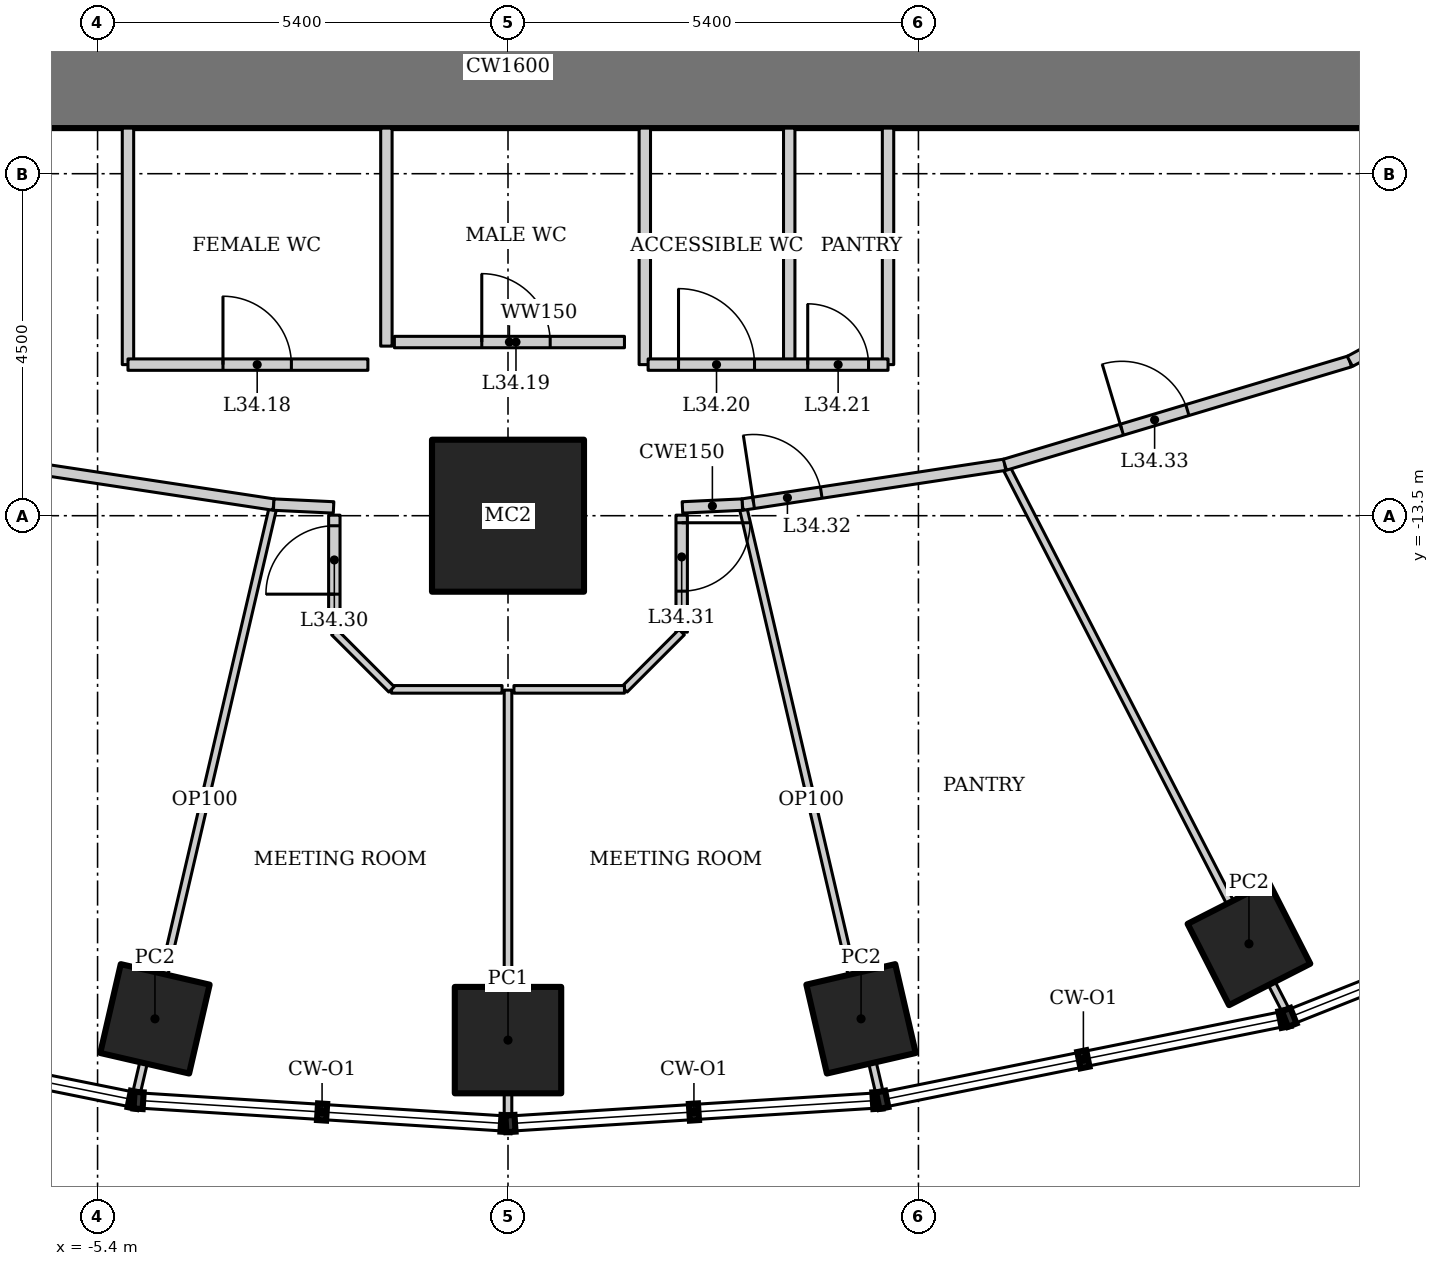
"""IFC4 building model, lengths in metres.
Left out: names, types, materials, properties, quantities, classifications, styles, units other than length and angle.
Written with IfcOpenShell. Run it as: python <this file> out.ifc"""

import sys

from ifc_helpers import new_model, si_unit, direction, frame, frame_2d, origin, origin_2d, place, context, subcontext, project, spatial, rectangle, hollow_rectangle, extrude, element, fill, save


model = new_model("IFC4")
c1 = context("Model", 3, precision=1e-05, world=origin(), true_north=direction((0.0, 1.0)))
c2 = subcontext(c1, "Body", "Model", "MODEL_VIEW")
j1 = project(units=[si_unit("LENGTHUNIT", "METRE"), si_unit("PLANEANGLEUNIT", "RADIAN")], contexts=[c1])
p1 = place(None, origin())
s1 = spatial("IfcSite", under=j1, at=p1, CompositionType="ELEMENT")
p2 = place(p1, origin())
s2 = spatial("IfcBuilding", under=s1, at=p2, CompositionType="ELEMENT")
p3 = place(p2, frame((0.0, 0.0, 146.8)))
s3 = spatial("IfcBuildingStorey", under=s2, at=p3, CompositionType="ELEMENT", Elevation=146.8)
p4 = place(p3, frame((0.0, -13.5, 0.0), z_axis=(0.0, 0.0, 1.0), x_axis=(1.0, 0.0, 0.0)))
e1 = element("IfcColumn", 1, at=p4, inside=s3, PredefinedType="COLUMN", context=c2, shape_type="SweptSolid", body=[
    extrude(hollow_rectangle(XDim=2.0, YDim=2.0, WallThickness=0.17, at=origin_2d()), origin(), (0.0, 0.0, 1.0), 4.2),
])
p5 = place(p3, frame((-4.645, -20.12, 0.0), z_axis=(0.0, 0.0, 1.0), x_axis=(0.224951054344, 0.974370064785, 0.0)))
e2 = element("IfcColumn", 2, at=p5, inside=s3, PredefinedType="COLUMN", context=c2, shape_type="SweptSolid", body=[
    extrude(hollow_rectangle(XDim=1.2, YDim=1.2, WallThickness=0.1, at=origin_2d()), origin(), (0.0, 0.0, 1.0), 4.2),
])
p6 = place(p3, frame((0.0, -20.4, 0.0), z_axis=(0.0, 0.0, 1.0), x_axis=(1.0, 0.0, 0.0)))
e3 = element("IfcColumn", 3, at=p6, inside=s3, PredefinedType="COLUMN", context=c2, shape_type="SweptSolid", body=[
    extrude(hollow_rectangle(XDim=1.4, YDim=1.4, WallThickness=0.1, at=origin_2d()), origin(), (0.0, 0.0, 1.0), 4.2),
])
for number, where, z_axis, x_axis in (
    (4, (4.645, -20.12, 0.0), (0.0, 0.0, 1.0), (0.974, 0.225, 0.0)),
    (5, (9.749, -19.133, 0.0), (0.0, 0.0, 1.0), (0.891, 0.454, 0.0)),
):
    element("IfcColumn", number, at=place(p3, frame(where, z_axis=z_axis, x_axis=x_axis)), inside=s3, PredefinedType="COLUMN", context=c2, shape_type="SweptSolid", body=[
        extrude(hollow_rectangle(XDim=1.2, YDim=1.2, WallThickness=0.1, at=origin_2d()), origin(), (0.0, 0.0, 1.0), 4.2),
    ])
p7 = place(p3, frame((-12.2, -7.6, 0.0), z_axis=(0.0, 0.0, 1.0), x_axis=(1.0, 0.0, 0.0)))
e6 = element("IfcWall", 6, at=p7, inside=s3, PredefinedType="SHEAR", context=c2, shape_type="SweptSolid", body=[
    extrude(rectangle(XDim=24.4, YDim=1.6, at=frame_2d((12.2, 0.0))), origin(), (0.0, 0.0, 1.0), 4.2),
])
for number, where, z_axis, x_axis in (
    (7, (-4.897, -21.135, 0.0), (0.0, 0.0, 1.0), (0.227, 0.974, 0.0)),
    (8, (4.897, -21.135, 0.0), (0.0, 0.0, 1.0), (-0.227, 0.974, 0.0)),
):
    element("IfcWall", number, at=place(p3, frame(where, z_axis=z_axis, x_axis=x_axis)), inside=s3, PredefinedType="PARTITIONING", context=c2, shape_type="SweptSolid", body=[
        extrude(rectangle(XDim=7.99, YDim=0.1, at=frame_2d((3.995, 0.0))), origin(), (0.0, 0.0, 1.0), 3.293),
    ])
p8 = place(p3, frame((10.253, -20.052, 0.0), z_axis=(0.0, 0.0, 1.0), x_axis=(-0.457535449567, 0.889191381194, 0.0)))
e9 = element("IfcWall", 9, at=p8, inside=s3, PredefinedType="PARTITIONING", context=c2, shape_type="SweptSolid", body=[
    extrude(rectangle(XDim=8.123, YDim=0.1, at=frame_2d((4.061, 0.0))), origin(), (0.0, 0.0, 1.0), 3.349),
])
p9 = place(p3, frame((-6.537, -12.829, 0.0), z_axis=(0.0, 0.0, 1.0), x_axis=(0.988668719464, -0.150113833987, 0.0)))
e10 = element("IfcWall", 10, at=p9, inside=s3, PredefinedType="PARTITIONING", context=c2, shape_type="SweptSolid", body=[
    extrude(rectangle(XDim=3.493, YDim=0.15, at=frame_2d((1.747, 0.0))), origin(), (0.0, 0.0, 1.0), 4.05),
])
p10 = place(p3, frame((3.083, -13.354, 0.0), z_axis=(0.0, 0.0, 1.0), x_axis=(0.988668719464, 0.150113833987, 0.0)))
e11 = element("IfcWall", 11, at=p10, inside=s3, PredefinedType="PARTITIONING", context=c2, shape_type="SweptSolid", body=[
    extrude(rectangle(XDim=3.493, YDim=0.15, at=frame_2d((1.747, 0.0))), origin(), (0.0, 0.0, 1.0), 4.05),
])
p11 = place(p10, frame((0.15, 0.0, 0.0)))
e12 = element("IfcOpeningElement", 12, at=p11, cuts=e11, PredefinedType="OPENING", context=c2, shape_type="SweptSolid", body=[
    extrude(rectangle(XDim=0.9, YDim=2.1, at=frame_2d((0.45, 1.05))), frame((0.0, 0.085, 0.0), z_axis=(0.0, -1.0, 0.0), x_axis=(1.0, 0.0, 0.0)), (0.0, 0.0, 1.0), 0.17),
])
p12 = place(p3, frame((6.537, -12.829, 0.0), z_axis=(0.0, 0.0, 1.0), x_axis=(0.957933992798, 0.286988615527, 0.0)))
e13 = element("IfcWall", 13, at=p12, inside=s3, PredefinedType="PARTITIONING", context=c2, shape_type="SweptSolid", body=[
    extrude(rectangle(XDim=4.738, YDim=0.15, at=frame_2d((2.369, 0.0))), origin(), (0.0, 0.0, 1.0), 4.05),
])
p13 = place(p12, frame((1.607, 0.0, 0.0)))
e14 = element("IfcOpeningElement", 14, at=p13, cuts=e13, PredefinedType="OPENING", context=c2, shape_type="SweptSolid", body=[
    extrude(rectangle(XDim=0.9, YDim=2.1, at=frame_2d((0.45, 1.05))), frame((0.0, 0.085, 0.0), z_axis=(0.0, -1.0, 0.0), x_axis=(1.0, 0.0, 0.0)), (0.0, 0.0, 1.0), 0.17),
])
p14 = place(p3, frame((11.076, -11.469, 0.0), z_axis=(0.0, 0.0, 1.0), x_axis=(0.879436285334, 0.476016617397, 0.0)))
e15 = element("IfcWall", 15, at=p14, inside=s3, PredefinedType="PARTITIONING", context=c2, shape_type="SweptSolid", body=[
    extrude(rectangle(XDim=5.253, YDim=0.15, at=frame_2d((2.626, 0.0))), origin(), (0.0, 0.0, 1.0), 4.05),
])
for number, where, z_axis, x_axis in (
    (16, (-5.0, -8.4, 0.0), (0.0, 0.0, 1.0), (0.0, -1.0, 0.0)),
    (17, (5.0, -8.4, 0.0), (0.0, 0.0, 1.0), (0.0, -1.0, 0.0)),
    (18, (1.8, -8.4, 0.0), (0.0, 0.0, 1.0), (0.0, -1.0, 0.0)),
    (19, (3.7, -8.4, 0.0), (0.0, 0.0, 1.0), (0.0, -1.0, 0.0)),
):
    element("IfcWall", number, at=place(p3, frame(where, z_axis=z_axis, x_axis=x_axis)), inside=s3, PredefinedType="SOLIDWALL", context=c2, shape_type="SweptSolid", body=[
        extrude(rectangle(XDim=3.112, YDim=0.15, at=frame_2d((1.556, 0.0))), origin(), (0.0, 0.0, 1.0), 4.05),
    ])
p15 = place(p3, frame((0.0, -21.445, 0.0), z_axis=(0.0, 0.0, 1.0), x_axis=(0.0, 1.0, 0.0)))
e20 = element("IfcWall", 20, at=p15, inside=s3, PredefinedType="PARTITIONING", context=c2, shape_type="SweptSolid", body=[
    extrude(rectangle(XDim=5.65, YDim=0.1, at=frame_2d((2.825, 0.0))), origin(), (0.0, 0.0, 1.0), 3.646),
])
for number, where, z_axis, x_axis in (
    (21, (-3.083, -13.354, 0.0), (0.0, 0.0, 1.0), (0.999, -0.047, 0.0)),
    (22, (2.295, -13.391, 0.0), (0.0, 0.0, 1.0), (0.999, 0.047, 0.0)),
):
    element("IfcWall", number, at=place(p3, frame(where, z_axis=z_axis, x_axis=x_axis)), inside=s3, PredefinedType="PARTITIONING", context=c2, shape_type="SweptSolid", body=[
        extrude(rectangle(XDim=0.789, YDim=0.15, at=frame_2d((0.395, 0.0))), origin(), (0.0, 0.0, 1.0), 4.05),
    ])
p16 = place(p3, frame((-5.0, -11.512, 0.0), z_axis=(0.0, 0.0, 1.0), x_axis=(1.0, 0.0, 0.0)))
e23 = element("IfcWall", 23, at=p16, inside=s3, PredefinedType="SOLIDWALL", context=c2, shape_type="SweptSolid", body=[
    extrude(rectangle(XDim=3.156, YDim=0.15, at=frame_2d((1.578, 0.0))), origin(), (0.0, 0.0, 1.0), 4.05),
])
p17 = place(p16, frame((1.25, 0.0, 0.0)))
e24 = element("IfcOpeningElement", 24, at=p17, cuts=e23, PredefinedType="OPENING", context=c2, shape_type="SweptSolid", body=[
    extrude(rectangle(XDim=0.9, YDim=2.1, at=frame_2d((0.45, 1.05))), frame((0.0, 0.085, 0.0), z_axis=(0.0, -1.0, 0.0), x_axis=(1.0, 0.0, 0.0)), (0.0, 0.0, 1.0), 0.17),
])
p18 = place(p3, frame((1.844, -11.512, 0.0), z_axis=(0.0, 0.0, 1.0), x_axis=(1.0, 0.0, 0.0)))
e25 = element("IfcWall", 25, at=p18, inside=s3, PredefinedType="SOLIDWALL", context=c2, shape_type="SweptSolid", body=[
    extrude(rectangle(XDim=3.156, YDim=0.15, at=frame_2d((1.578, 0.0))), origin(), (0.0, 0.0, 1.0), 4.05),
])
p19 = place(p18, frame((0.4, 0.0, 0.0)))
e26 = element("IfcOpeningElement", 26, at=p19, cuts=e25, PredefinedType="OPENING", context=c2, shape_type="SweptSolid", body=[
    extrude(rectangle(XDim=1.0, YDim=2.1, at=frame_2d((0.5, 1.05))), frame((0.0, 0.085, 0.0), z_axis=(0.0, -1.0, 0.0), x_axis=(1.0, 0.0, 0.0)), (0.0, 0.0, 1.0), 0.17),
])
p20 = place(p18, frame((2.1, 0.0, 0.0)))
e27 = element("IfcOpeningElement", 27, at=p20, cuts=e25, PredefinedType="OPENING", context=c2, shape_type="SweptSolid", body=[
    extrude(rectangle(XDim=0.8, YDim=2.1, at=frame_2d((0.4, 1.05))), frame((0.0, 0.085, 0.0), z_axis=(0.0, -1.0, 0.0), x_axis=(1.0, 0.0, 0.0)), (0.0, 0.0, 1.0), 0.17),
])
p21 = place(p3, frame((-1.6, -8.4, 0.0), z_axis=(0.0, 0.0, 1.0), x_axis=(0.0, -1.0, 0.0)))
e28 = element("IfcWall", 28, at=p21, inside=s3, PredefinedType="SOLIDWALL", context=c2, shape_type="SweptSolid", body=[
    extrude(rectangle(XDim=2.869, YDim=0.15, at=frame_2d((1.434, 0.0))), origin(), (0.0, 0.0, 1.0), 4.05),
])
p22 = place(p3, frame((-1.495, -11.215, 0.0), z_axis=(0.0, 0.0, 1.0), x_axis=(1.0, 0.0, 0.0)))
e29 = element("IfcWall", 29, at=p22, inside=s3, PredefinedType="SOLIDWALL", context=c2, shape_type="SweptSolid", body=[
    extrude(rectangle(XDim=3.027, YDim=0.15, at=frame_2d((1.514, 0.0))), origin(), (0.0, 0.0, 1.0), 4.05),
])
p23 = place(p22, frame((1.15, 0.0, 0.0)))
e30 = element("IfcOpeningElement", 30, at=p23, cuts=e29, PredefinedType="OPENING", context=c2, shape_type="SweptSolid", body=[
    extrude(rectangle(XDim=0.9, YDim=2.1, at=frame_2d((0.45, 1.05))), frame((0.0, 0.085, 0.0), z_axis=(0.0, -1.0, 0.0), x_axis=(1.0, 0.0, 0.0)), (0.0, 0.0, 1.0), 0.17),
])
p24 = place(p3, frame((-2.285, -15.032, 0.0), z_axis=(0.0, 0.0, 1.0), x_axis=(0.0, 1.0, 0.0)))
e31 = element("IfcWall", 31, at=p24, inside=s3, PredefinedType="PARTITIONING", context=c2, shape_type="SweptSolid", body=[
    extrude(rectangle(XDim=1.54, YDim=0.15, at=frame_2d((0.77, 0.0))), origin(), (0.0, 0.0, 1.0), 4.05),
])
p25 = place(p24, frame((0.5, 0.0, 0.0)))
e32 = element("IfcOpeningElement", 32, at=p25, cuts=e31, PredefinedType="OPENING", context=c2, shape_type="SweptSolid", body=[
    extrude(rectangle(XDim=0.9, YDim=2.1, at=frame_2d((0.45, 1.05))), frame((0.0, 0.085, 0.0), z_axis=(0.0, -1.0, 0.0), x_axis=(1.0, 0.0, 0.0)), (0.0, 0.0, 1.0), 0.17),
])
p26 = place(p3, frame((-0.078, -15.785, 0.0), z_axis=(0.0, 0.0, 1.0), x_axis=(-1.0, 0.0, 0.0)))
e33 = element("IfcWall", 33, at=p26, inside=s3, PredefinedType="PARTITIONING", context=c2, shape_type="SweptSolid", body=[
    extrude(rectangle(XDim=1.454, YDim=0.1, at=frame_2d((0.727, 0.0))), origin(), (0.0, 0.0, 1.0), 4.05),
])
p27 = place(p3, frame((-1.532, -15.785, 0.0), z_axis=(0.0, 0.0, 1.0), x_axis=(-0.707106781187, 0.707106781187, 0.0)))
e34 = element("IfcWall", 34, at=p27, inside=s3, PredefinedType="PARTITIONING", context=c2, shape_type="SweptSolid", body=[
    extrude(rectangle(XDim=1.064, YDim=0.1, at=frame_2d((0.532, 0.0))), origin(), (0.0, 0.0, 1.0), 4.05),
])
p28 = place(p3, frame((2.285, -13.493, 0.0), z_axis=(0.0, 0.0, 1.0), x_axis=(0.0, -1.0, 0.0)))
e35 = element("IfcWall", 35, at=p28, inside=s3, PredefinedType="PARTITIONING", context=c2, shape_type="SweptSolid", body=[
    extrude(rectangle(XDim=1.54, YDim=0.15, at=frame_2d((0.77, 0.0))), origin(), (0.0, 0.0, 1.0), 4.05),
])
p29 = place(p28, frame((0.1, 0.0, 0.0)))
e36 = element("IfcOpeningElement", 36, at=p29, cuts=e35, PredefinedType="OPENING", context=c2, shape_type="SweptSolid", body=[
    extrude(rectangle(XDim=0.9, YDim=2.1, at=frame_2d((0.45, 1.05))), frame((0.0, 0.085, 0.0), z_axis=(0.0, -1.0, 0.0), x_axis=(1.0, 0.0, 0.0)), (0.0, 0.0, 1.0), 0.17),
])
p30 = place(p3, frame((2.285, -15.032, 0.0), z_axis=(0.0, 0.0, 1.0), x_axis=(-0.707106781187, -0.707106781187, 0.0)))
e37 = element("IfcWall", 37, at=p30, inside=s3, PredefinedType="PARTITIONING", context=c2, shape_type="SweptSolid", body=[
    extrude(rectangle(XDim=1.064, YDim=0.1, at=frame_2d((0.532, 0.0))), origin(), (0.0, 0.0, 1.0), 4.05),
])
p31 = place(p3, frame((1.532, -15.785, 0.0), z_axis=(0.0, 0.0, 1.0), x_axis=(-1.0, 0.0, 0.0)))
e38 = element("IfcWall", 38, at=p31, inside=s3, PredefinedType="PARTITIONING", context=c2, shape_type="SweptSolid", body=[
    extrude(rectangle(XDim=1.454, YDim=0.1, at=frame_2d((0.727, 0.0))), origin(), (0.0, 0.0, 1.0), 4.05),
])
p32 = place(p17, origin())
e39 = element("IfcDoor", 39, at=p32, inside=s3, OperationType="SINGLE_SWING_LEFT", PredefinedType="DOOR", context=c2, shape_type="SweptSolid", body=[
    extrude(rectangle(XDim=0.9, YDim=2.1, at=frame_2d((0.45, 1.05))), frame((0.0, 0.025, 0.0), z_axis=(0.0, -1.0, 0.0), x_axis=(1.0, 0.0, 0.0)), (0.0, 0.0, 1.0), 0.05),
])
fill(e24, e39)
p33 = place(p23, origin())
e40 = element("IfcDoor", 40, at=p33, inside=s3, OperationType="SINGLE_SWING_LEFT", PredefinedType="DOOR", context=c2, shape_type="SweptSolid", body=[
    extrude(rectangle(XDim=0.9, YDim=2.1, at=frame_2d((0.45, 1.05))), frame((0.0, 0.025, 0.0), z_axis=(0.0, -1.0, 0.0), x_axis=(1.0, 0.0, 0.0)), (0.0, 0.0, 1.0), 0.05),
])
fill(e30, e40)
p34 = place(p19, origin())
e41 = element("IfcDoor", 41, at=p34, inside=s3, OperationType="SINGLE_SWING_LEFT", PredefinedType="DOOR", context=c2, shape_type="SweptSolid", body=[
    extrude(rectangle(XDim=1.0, YDim=2.1, at=frame_2d((0.5, 1.05))), frame((0.0, 0.025, 0.0), z_axis=(0.0, -1.0, 0.0), x_axis=(1.0, 0.0, 0.0)), (0.0, 0.0, 1.0), 0.05),
])
fill(e26, e41)
p35 = place(p20, origin())
e42 = element("IfcDoor", 42, at=p35, inside=s3, OperationType="SINGLE_SWING_LEFT", PredefinedType="DOOR", context=c2, shape_type="SweptSolid", body=[
    extrude(rectangle(XDim=0.8, YDim=2.1, at=frame_2d((0.4, 1.05))), frame((0.0, 0.025, 0.0), z_axis=(0.0, -1.0, 0.0), x_axis=(1.0, 0.0, 0.0)), (0.0, 0.0, 1.0), 0.05),
])
fill(e27, e42)
p36 = place(p25, origin())
e43 = element("IfcDoor", 43, at=p36, inside=s3, OperationType="SINGLE_SWING_LEFT", PredefinedType="DOOR", context=c2, shape_type="SweptSolid", body=[
    extrude(rectangle(XDim=0.9, YDim=2.1, at=frame_2d((0.45, 1.05))), frame((0.0, 0.025, 0.0), z_axis=(0.0, -1.0, 0.0), x_axis=(1.0, 0.0, 0.0)), (0.0, 0.0, 1.0), 0.05),
])
fill(e32, e43)
p37 = place(p29, origin())
e44 = element("IfcDoor", 44, at=p37, inside=s3, OperationType="SINGLE_SWING_LEFT", PredefinedType="DOOR", context=c2, shape_type="SweptSolid", body=[
    extrude(rectangle(XDim=0.9, YDim=2.1, at=frame_2d((0.45, 1.05))), frame((0.0, 0.025, 0.0), z_axis=(0.0, -1.0, 0.0), x_axis=(1.0, 0.0, 0.0)), (0.0, 0.0, 1.0), 0.05),
])
fill(e36, e44)
p38 = place(p11, origin())
e45 = element("IfcDoor", 45, at=p38, inside=s3, OperationType="SINGLE_SWING_LEFT", PredefinedType="DOOR", context=c2, shape_type="SweptSolid", body=[
    extrude(rectangle(XDim=0.9, YDim=2.1, at=frame_2d((0.45, 1.05))), frame((0.0, 0.025, 0.0), z_axis=(0.0, -1.0, 0.0), x_axis=(1.0, 0.0, 0.0)), (0.0, 0.0, 1.0), 0.05),
])
fill(e12, e45)
p39 = place(p13, origin())
e46 = element("IfcDoor", 46, at=p39, inside=s3, OperationType="SINGLE_SWING_LEFT", PredefinedType="DOOR", context=c2, shape_type="SweptSolid", body=[
    extrude(rectangle(XDim=0.9, YDim=2.1, at=frame_2d((0.45, 1.05))), frame((0.0, 0.025, 0.0), z_axis=(0.0, -1.0, 0.0), x_axis=(1.0, 0.0, 0.0)), (0.0, 0.0, 1.0), 0.05),
])
fill(e14, e46)
save(model, sys.argv[1])
